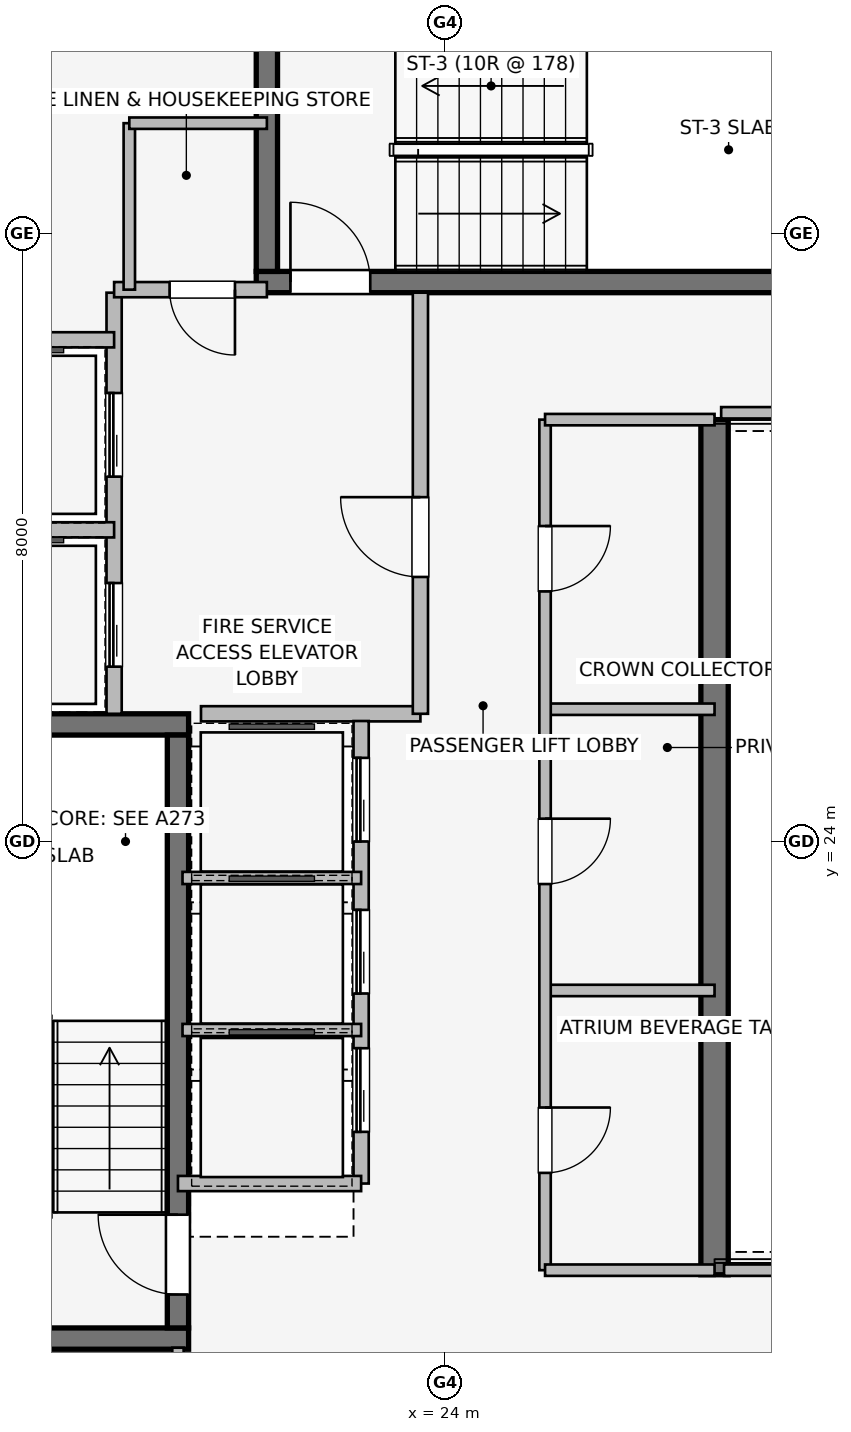
"""IFC4 building model, lengths in metres.
Left out: names, types, materials, properties, quantities, classifications, styles, units other than length and angle.
Written with IfcOpenShell. Run it as: python <this file> out.ifc"""

import sys

from ifc_helpers import new_model, si_unit, direction, frame, frame_2d, origin, place, context, subcontext, project, spatial, rectangle, extrude, element, fill, save


model = new_model("IFC4")
c1 = context("Model", 3, precision=1e-05, world=origin(), true_north=direction((0.0, 1.0)))
c2 = subcontext(c1, "Body", "Model", "MODEL_VIEW")
j1 = project(units=[si_unit("LENGTHUNIT", "METRE"), si_unit("PLANEANGLEUNIT", "RADIAN")], contexts=[c1])
p1 = place(None, origin())
s1 = spatial("IfcSite", under=j1, at=p1, CompositionType="ELEMENT")
p2 = place(p1, origin())
s2 = spatial("IfcBuilding", under=s1, at=p2, CompositionType="ELEMENT")
p3 = place(p2, frame((0.0, 0.0, 259.65)))
s3 = spatial("IfcBuildingStorey", under=s2, at=p3, CompositionType="ELEMENT", Elevation=259.65)
p4 = place(p3, frame((27.55, 29.55, 0.0), z_axis=(0.0, 0.0, 1.0), x_axis=(0.0, -1.0, 0.0)))
e1 = element("IfcWall", 1, at=p4, inside=s3, PredefinedType="SHEAR", context=c2, shape_type="SweptSolid", body=[
    extrude(rectangle(XDim=11.25, YDim=0.36, at=frame_2d((5.625, 0.0))), origin(), (0.0, 0.0, 1.0), 3.55),
])
for number, where, z_axis, x_axis in (
    (2, (16.87, 17.46, 0.0), (0.0, 0.0, 1.0), (1.0, 0.0, 0.0)),
    (3, (20.63, 25.54, 0.0), (0.0, 0.0, 1.0), (-1.0, 0.0, 0.0)),
):
    element("IfcWall", number, at=place(p3, frame(where, z_axis=z_axis, x_axis=x_axis)), inside=s3, PredefinedType="SHEAR", context=c2, shape_type="SweptSolid", body=[
        extrude(rectangle(XDim=3.76, YDim=0.28, at=frame_2d((1.88, 0.0))), origin(), (0.0, 0.0, 1.0), 3.55),
    ])
p5 = place(p3, frame((20.49, 17.6, 0.0), z_axis=(0.0, 0.0, 1.0), x_axis=(0.0, 1.0, 0.0)))
e4 = element("IfcWall", 4, at=p5, inside=s3, PredefinedType="SHEAR", context=c2, shape_type="SweptSolid", body=[
    extrude(rectangle(XDim=7.8, YDim=0.28, at=frame_2d((3.9, 0.0))), origin(), (0.0, 0.0, 1.0), 3.55),
])
p6 = place(p5, frame((0.44, 0.0, 0.0)))
e5 = element("IfcOpeningElement", 5, at=p6, cuts=e4, PredefinedType="OPENING", context=c2, shape_type="SweptSolid", body=[
    extrude(rectangle(XDim=1.05, YDim=2.0, at=frame_2d((0.525, 1.0))), frame((0.0, 0.15, 0.0), z_axis=(0.0, -1.0, 0.0), x_axis=(1.0, 0.0, 0.0)), (0.0, 0.0, 1.0), 0.3),
])
p7 = place(p3, frame((21.52, 31.36, 0.0), z_axis=(0.0, 0.0, 1.0), x_axis=(1.0, 0.0, 0.0)))
e6 = element("IfcWall", 6, at=p7, inside=s3, PredefinedType="SHEAR", context=c2, shape_type="SweptSolid", body=[
    extrude(rectangle(XDim=8.36, YDim=0.28, at=frame_2d((4.18, 0.0))), origin(), (0.0, 0.0, 1.0), 3.55),
])
p8 = place(p7, frame((0.45, 0.0, 0.0)))
e7 = element("IfcOpeningElement", 7, at=p8, cuts=e6, PredefinedType="OPENING", context=c2, shape_type="SweptSolid", body=[
    extrude(rectangle(XDim=1.05, YDim=2.0, at=frame_2d((0.525, 1.0))), frame((0.0, 0.15, 0.0), z_axis=(0.0, -1.0, 0.0), x_axis=(1.0, 0.0, 0.0)), (0.0, 0.0, 1.0), 0.3),
])
p9 = place(p3, frame((21.66, 34.7, 0.0), z_axis=(0.0, 0.0, 1.0), x_axis=(0.0, -1.0, 0.0)))
e8 = element("IfcWall", 8, at=p9, inside=s3, PredefinedType="SHEAR", context=c2, shape_type="SweptSolid", body=[
    extrude(rectangle(XDim=3.2, YDim=0.28, at=frame_2d((1.6, 0.0))), origin(), (0.0, 0.0, 1.0), 3.55),
])
p10 = place(p3, frame((17.566, 34.354, 0.0), z_axis=(0.0, 0.0, 1.0), x_axis=(0.888581481622, 0.458718814218, 0.0)))
e9 = element("IfcWall", 9, at=p10, inside=s3, PredefinedType="STANDARD", context=c2, shape_type="SweptSolid", body=[
    extrude(rectangle(XDim=15.077, YDim=0.31, at=frame_2d((7.539, 0.0))), origin(), (0.0, 0.0, 1.0), 3.29),
])
p11 = place(p10, frame((0.998, 0.0, 0.75)))
e10 = element("IfcOpeningElement", 10, at=p11, cuts=e9, PredefinedType="OPENING", context=c2, shape_type="SweptSolid", body=[
    extrude(rectangle(XDim=1.05, YDim=1.4, at=frame_2d((0.525, 0.7))), frame((0.0, 0.165, 0.0), z_axis=(0.0, -1.0, 0.0), x_axis=(1.0, 0.0, 0.0)), (0.0, 0.0, 1.0), 0.33),
])
p12 = place(p10, frame((4.403, 0.0, 0.75)))
e11 = element("IfcOpeningElement", 11, at=p12, cuts=e9, PredefinedType="OPENING", context=c2, shape_type="SweptSolid", body=[
    extrude(rectangle(XDim=1.05, YDim=1.4, at=frame_2d((0.525, 0.7))), frame((0.0, 0.165, 0.0), z_axis=(0.0, -1.0, 0.0), x_axis=(1.0, 0.0, 0.0)), (0.0, 0.0, 1.0), 0.33),
])
p13 = place(p10, frame((8.086, 0.0, 0.75)))
e12 = element("IfcOpeningElement", 12, at=p13, cuts=e9, PredefinedType="OPENING", context=c2, shape_type="SweptSolid", body=[
    extrude(rectangle(XDim=2.4, YDim=1.6, at=frame_2d((1.2, 0.8))), frame((0.0, 0.165, 0.0), z_axis=(0.0, -1.0, 0.0), x_axis=(1.0, 0.0, 0.0)), (0.0, 0.0, 1.0), 0.33),
])
p14 = place(p10, frame((13.029, 0.0, 0.75)))
e13 = element("IfcOpeningElement", 13, at=p14, cuts=e9, PredefinedType="OPENING", context=c2, shape_type="SweptSolid", body=[
    extrude(rectangle(XDim=1.05, YDim=1.4, at=frame_2d((0.525, 0.7))), frame((0.0, 0.165, 0.0), z_axis=(0.0, -1.0, 0.0), x_axis=(1.0, 0.0, 0.0)), (0.0, 0.0, 1.0), 0.33),
])
p15 = place(p3, frame((19.65, 25.68, 0.0), z_axis=(0.0, 0.0, 1.0), x_axis=(0.0, 1.0, 0.0)))
e14 = element("IfcWall", 14, at=p15, inside=s3, PredefinedType="PARTITIONING", context=c2, shape_type="SweptSolid", body=[
    extrude(rectangle(XDim=5.54, YDim=0.2, at=frame_2d((2.77, 0.0))), origin(), (0.0, 0.0, 1.0), 3.29),
])
p16 = place(p15, frame((0.62, 0.0, 0.0)))
e15 = element("IfcOpeningElement", 15, at=p16, cuts=e14, PredefinedType="OPENING", context=c2, shape_type="SweptSolid", body=[
    extrude(rectangle(XDim=1.1, YDim=2.2, at=frame_2d((0.55, 1.1))), frame((0.0, 0.11, 0.0), z_axis=(0.0, -1.0, 0.0), x_axis=(1.0, 0.0, 0.0)), (0.0, 0.0, 1.0), 0.22),
])
p17 = place(p15, frame((3.12, 0.0, 0.0)))
e16 = element("IfcOpeningElement", 16, at=p17, cuts=e14, PredefinedType="OPENING", context=c2, shape_type="SweptSolid", body=[
    extrude(rectangle(XDim=1.1, YDim=2.2, at=frame_2d((0.55, 1.1))), frame((0.0, 0.11, 0.0), z_axis=(0.0, -1.0, 0.0), x_axis=(1.0, 0.0, 0.0)), (0.0, 0.0, 1.0), 0.22),
])
p18 = place(p3, frame((20.793, 25.68, 0.0), z_axis=(0.0, 0.0, 1.0), x_axis=(1.0, 0.0, 0.0)))
e17 = element("IfcWall", 17, at=p18, inside=s3, PredefinedType="PARTITIONING", context=c2, shape_type="SweptSolid", body=[
    extrude(rectangle(XDim=2.887, YDim=0.2, at=frame_2d((1.443, 0.0))), origin(), (0.0, 0.0, 1.0), 3.29),
])
p19 = place(p3, frame((23.68, 25.68, 0.0), z_axis=(0.0, 0.0, 1.0), x_axis=(0.0, 1.0, 0.0)))
e18 = element("IfcWall", 18, at=p19, inside=s3, PredefinedType="PARTITIONING", context=c2, shape_type="SweptSolid", body=[
    extrude(rectangle(XDim=5.54, YDim=0.2, at=frame_2d((2.77, 0.0))), origin(), (0.0, 0.0, 1.0), 3.29),
])
p20 = place(p19, frame((1.8, 0.0, 0.0)))
e19 = element("IfcOpeningElement", 19, at=p20, cuts=e18, PredefinedType="OPENING", context=c2, shape_type="SweptSolid", body=[
    extrude(rectangle(XDim=1.05, YDim=2.0, at=frame_2d((0.525, 1.0))), frame((0.0, 0.11, 0.0), z_axis=(0.0, -1.0, 0.0), x_axis=(1.0, 0.0, 0.0)), (0.0, 0.0, 1.0), 0.22),
])
p21 = place(p3, frame((21.66, 31.26, 0.0), z_axis=(0.0, 0.0, 1.0), x_axis=(-1.0, 0.0, 0.0)))
e20 = element("IfcWall", 20, at=p21, inside=s3, PredefinedType="PARTITIONING", context=c2, shape_type="SweptSolid", body=[
    extrude(rectangle(XDim=2.01, YDim=0.2, at=frame_2d((1.005, 0.0))), origin(), (0.0, 0.0, 1.0), 3.29),
])
p22 = place(p21, frame((0.42, 0.0, 0.0)))
e21 = element("IfcOpeningElement", 21, at=p22, cuts=e20, PredefinedType="OPENING", context=c2, shape_type="SweptSolid", body=[
    extrude(rectangle(XDim=0.86, YDim=2.0, at=frame_2d((0.43, 1.0))), frame((0.0, 0.11, 0.0), z_axis=(0.0, -1.0, 0.0), x_axis=(1.0, 0.0, 0.0)), (0.0, 0.0, 1.0), 0.22),
])
p23 = place(p3, frame((17.15, 28.1, 0.0), z_axis=(0.0, 0.0, 1.0), x_axis=(1.0, 0.0, 0.0)))
e22 = element("IfcWall", 22, at=p23, inside=s3, PredefinedType="PARTITIONING", context=c2, shape_type="SweptSolid", body=[
    extrude(rectangle(XDim=2.5, YDim=0.2, at=frame_2d((1.25, 0.0))), origin(), (0.0, 0.0, 1.0), 3.29),
])
p24 = place(p3, frame((19.65, 30.6, 0.0), z_axis=(0.0, 0.0, 1.0), x_axis=(-1.0, 0.0, 0.0)))
e23 = element("IfcWall", 23, at=p24, inside=s3, PredefinedType="PARTITIONING", context=c2, shape_type="SweptSolid", body=[
    extrude(rectangle(XDim=2.5, YDim=0.2, at=frame_2d((1.25, 0.0))), origin(), (0.0, 0.0, 1.0), 2.19),
])
p25 = place(p3, frame((22.9, 19.5, 0.0), z_axis=(0.0, 0.0, 1.0), x_axis=(0.0, 1.0, 0.0)))
e24 = element("IfcWall", 24, at=p25, inside=s3, PredefinedType="PARTITIONING", context=c2, shape_type="SweptSolid", body=[
    extrude(rectangle(XDim=6.085, YDim=0.2, at=frame_2d((3.042, 0.0))), origin(), (0.0, 0.0, 1.0), 3.29),
])
p26 = place(p25, frame((0.68, 0.0, 0.0)))
e25 = element("IfcOpeningElement", 25, at=p26, cuts=e24, PredefinedType="OPENING", context=c2, shape_type="SweptSolid", body=[
    extrude(rectangle(XDim=1.1, YDim=2.2, at=frame_2d((0.55, 1.1))), frame((0.0, 0.11, 0.0), z_axis=(0.0, -1.0, 0.0), x_axis=(1.0, 0.0, 0.0)), (0.0, 0.0, 1.0), 0.22),
])
p27 = place(p25, frame((2.5, 0.0, 0.0)))
e26 = element("IfcOpeningElement", 26, at=p27, cuts=e24, PredefinedType="OPENING", context=c2, shape_type="SweptSolid", body=[
    extrude(rectangle(XDim=1.1, YDim=2.2, at=frame_2d((0.55, 1.1))), frame((0.0, 0.11, 0.0), z_axis=(0.0, -1.0, 0.0), x_axis=(1.0, 0.0, 0.0)), (0.0, 0.0, 1.0), 0.22),
])
p28 = place(p25, frame((4.5, 0.0, 0.0)))
e27 = element("IfcOpeningElement", 27, at=p28, cuts=e24, PredefinedType="OPENING", context=c2, shape_type="SweptSolid", body=[
    extrude(rectangle(XDim=1.1, YDim=2.2, at=frame_2d((0.55, 1.1))), frame((0.0, 0.11, 0.0), z_axis=(0.0, -1.0, 0.0), x_axis=(1.0, 0.0, 0.0)), (0.0, 0.0, 1.0), 0.22),
])
p29 = place(p3, frame((20.49, 19.5, 0.0), z_axis=(0.0, 0.0, 1.0), x_axis=(1.0, 0.0, 0.0)))
e28 = element("IfcWall", 28, at=p29, inside=s3, PredefinedType="PARTITIONING", context=c2, shape_type="SweptSolid", body=[
    extrude(rectangle(XDim=2.41, YDim=0.2, at=frame_2d((1.205, 0.0))), origin(), (0.0, 0.0, 1.0), 2.19),
])
for number, where, z_axis, x_axis in (
    (29, (20.55, 21.52, 0.0), (0.0, 0.0, 1.0), (1.0, 0.0, 0.0)),
    (30, (20.55, 23.52, 0.0), (0.0, 0.0, 1.0), (1.0, 0.0, 0.0)),
):
    element("IfcWall", number, at=place(p3, frame(where, z_axis=z_axis, x_axis=x_axis)), inside=s3, PredefinedType="PARTITIONING", context=c2, shape_type="SweptSolid", body=[
        extrude(rectangle(XDim=2.35, YDim=0.16, at=frame_2d((1.175, 0.0))), origin(), (0.0, 0.0, 1.0), 3.29),
    ])
for number, where, z_axis, x_axis in (
    (31, (25.32, 22.04, 0.0), (0.0, 0.0, 1.0), (1.0, 0.0, 0.0)),
    (32, (25.32, 25.74, 0.0), (0.0, 0.0, 1.0), (1.0, 0.0, 0.0)),
):
    element("IfcWall", number, at=place(p3, frame(where, z_axis=z_axis, x_axis=x_axis)), inside=s3, PredefinedType="PARTITIONING", context=c2, shape_type="SweptSolid", body=[
        extrude(rectangle(XDim=2.23, YDim=0.15, at=frame_2d((1.115, 0.0))), origin(), (0.0, 0.0, 1.0), 3.29),
    ])
p30 = place(p3, frame((25.32, 29.55, 0.0), z_axis=(0.0, 0.0, 1.0), x_axis=(0.0, -1.0, 0.0)))
e33 = element("IfcWall", 33, at=p30, inside=s3, PredefinedType="PARTITIONING", context=c2, shape_type="SweptSolid", body=[
    extrude(rectangle(XDim=11.19, YDim=0.15, at=frame_2d((5.595, 0.0))), origin(), (0.0, 0.0, 1.0), 3.29),
])
p31 = place(p30, frame((1.4, 0.0, 0.0)))
e34 = element("IfcOpeningElement", 34, at=p31, cuts=e33, PredefinedType="OPENING", context=c2, shape_type="SweptSolid", body=[
    extrude(rectangle(XDim=0.86, YDim=2.0, at=frame_2d((0.43, 1.0))), frame((0.0, 0.085, 0.0), z_axis=(0.0, -1.0, 0.0), x_axis=(1.0, 0.0, 0.0)), (0.0, 0.0, 1.0), 0.17),
])
p32 = place(p30, frame((5.25, 0.0, 0.0)))
e35 = element("IfcOpeningElement", 35, at=p32, cuts=e33, PredefinedType="OPENING", context=c2, shape_type="SweptSolid", body=[
    extrude(rectangle(XDim=0.86, YDim=2.0, at=frame_2d((0.43, 1.0))), frame((0.0, 0.085, 0.0), z_axis=(0.0, -1.0, 0.0), x_axis=(1.0, 0.0, 0.0)), (0.0, 0.0, 1.0), 0.17),
])
p33 = place(p30, frame((9.05, 0.0, 0.0)))
e36 = element("IfcOpeningElement", 36, at=p33, cuts=e33, PredefinedType="OPENING", context=c2, shape_type="SweptSolid", body=[
    extrude(rectangle(XDim=0.86, YDim=2.0, at=frame_2d((0.43, 1.0))), frame((0.0, 0.085, 0.0), z_axis=(0.0, -1.0, 0.0), x_axis=(1.0, 0.0, 0.0)), (0.0, 0.0, 1.0), 0.17),
])
p34 = place(p3, frame((25.32, 18.36, 0.0), z_axis=(0.0, 0.0, 1.0), x_axis=(1.0, 0.0, 0.0)))
e37 = element("IfcWall", 37, at=p34, inside=s3, PredefinedType="PARTITIONING", context=c2, shape_type="SweptSolid", body=[
    extrude(rectangle(XDim=2.23, YDim=0.15, at=frame_2d((1.115, 0.0))), origin(), (0.0, 0.0, 1.0), 3.29),
])
p35 = place(p3, frame((27.55, 29.55, 0.0), z_axis=(0.0, 0.0, 1.0), x_axis=(-1.0, 0.0, 0.0)))
e38 = element("IfcWall", 38, at=p35, inside=s3, PredefinedType="PARTITIONING", context=c2, shape_type="SweptSolid", body=[
    extrude(rectangle(XDim=2.23, YDim=0.15, at=frame_2d((1.115, 0.0))), origin(), (0.0, 0.0, 1.0), 2.19),
])
p36 = place(p3, frame((20.49, 14.82, 0.0), z_axis=(0.0, 0.0, 1.0), x_axis=(0.0, 1.0, 0.0)))
e39 = element("IfcWall", 39, at=p36, inside=s3, PredefinedType="PARTITIONING", context=c2, shape_type="SweptSolid", body=[
    extrude(rectangle(XDim=2.52, YDim=0.15, at=frame_2d((1.26, 0.0))), origin(), (0.0, 0.0, 1.0), 3.29),
])
p37 = place(p36, frame((0.72, 0.0, 0.0)))
e40 = element("IfcOpeningElement", 40, at=p37, cuts=e39, PredefinedType="OPENING", context=c2, shape_type="SweptSolid", body=[
    extrude(rectangle(XDim=0.86, YDim=2.0, at=frame_2d((0.43, 1.0))), frame((0.0, 0.085, 0.0), z_axis=(0.0, -1.0, 0.0), x_axis=(1.0, 0.0, 0.0)), (0.0, 0.0, 1.0), 0.17),
])
p38 = place(p3, frame((19.85, 33.45, 0.0), z_axis=(0.0, 0.0, 1.0), x_axis=(0.0, -1.0, 0.0)))
e41 = element("IfcWall", 41, at=p38, inside=s3, PredefinedType="PARTITIONING", context=c2, shape_type="SweptSolid", body=[
    extrude(rectangle(XDim=2.19, YDim=0.15, at=frame_2d((1.095, 0.0))), origin(), (0.0, 0.0, 1.0), 3.29),
])
p39 = place(p3, frame((21.66, 33.45, 0.0), z_axis=(0.0, 0.0, 1.0), x_axis=(-1.0, 0.0, 0.0)))
e42 = element("IfcWall", 42, at=p39, inside=s3, PredefinedType="PARTITIONING", context=c2, shape_type="SweptSolid", body=[
    extrude(rectangle(XDim=1.81, YDim=0.15, at=frame_2d((0.905, 0.0))), origin(), (0.0, 0.0, 1.0), 3.29),
])
p40 = place(p3, frame((27.675, 18.36, 0.0), z_axis=(0.0, 0.0, 1.0), x_axis=(1.0, 0.0, 0.0)))
e43 = element("IfcWall", 43, at=p40, inside=s3, PredefinedType="PARTITIONING", context=c2, shape_type="SweptSolid", body=[
    extrude(rectangle(XDim=12.165, YDim=0.15, at=frame_2d((6.083, 0.0))), origin(), (0.0, 0.0, 1.0), 2.431),
])
p41 = place(p3, frame((39.84, 29.64, 0.0), z_axis=(0.0, 0.0, 1.0), x_axis=(-1.0, 0.0, 0.0)))
e44 = element("IfcWall", 44, at=p41, inside=s3, PredefinedType="PARTITIONING", context=c2, shape_type="SweptSolid", body=[
    extrude(rectangle(XDim=12.203, YDim=0.15, at=frame_2d((6.102, 0.0))), origin(), (0.0, 0.0, 1.0), 2.431),
])
p42 = place(p6, origin())
e45 = element("IfcDoor", 45, at=p42, inside=s3, OperationType="SINGLE_SWING_RIGHT", PredefinedType="DOOR", context=c2, shape_type="SweptSolid", body=[
    extrude(rectangle(XDim=1.05, YDim=2.0, at=frame_2d((0.525, 1.0))), frame((0.0, 0.025, 0.0), z_axis=(0.0, -1.0, 0.0), x_axis=(1.0, 0.0, 0.0)), (0.0, 0.0, 1.0), 0.05),
])
fill(e5, e45)
p43 = place(p8, origin())
e46 = element("IfcDoor", 46, at=p43, inside=s3, OperationType="SINGLE_SWING_LEFT", PredefinedType="DOOR", context=c2, shape_type="SweptSolid", body=[
    extrude(rectangle(XDim=1.05, YDim=2.0, at=frame_2d((0.525, 1.0))), frame((0.0, 0.025, 0.0), z_axis=(0.0, -1.0, 0.0), x_axis=(1.0, 0.0, 0.0)), (0.0, 0.0, 1.0), 0.05),
])
fill(e7, e46)
p44 = place(p16, origin())
e47 = element("IfcDoor", 47, at=p44, inside=s3, OperationType="SLIDING_TO_LEFT", PredefinedType="DOOR", context=c2, shape_type="SweptSolid", body=[
    extrude(rectangle(XDim=1.1, YDim=2.2, at=frame_2d((0.55, 1.1))), frame((0.0, 0.025, 0.0), z_axis=(0.0, -1.0, 0.0), x_axis=(1.0, 0.0, 0.0)), (0.0, 0.0, 1.0), 0.05),
])
fill(e15, e47)
p45 = place(p17, origin())
e48 = element("IfcDoor", 48, at=p45, inside=s3, OperationType="SLIDING_TO_LEFT", PredefinedType="DOOR", context=c2, shape_type="SweptSolid", body=[
    extrude(rectangle(XDim=1.1, YDim=2.2, at=frame_2d((0.55, 1.1))), frame((0.0, 0.025, 0.0), z_axis=(0.0, -1.0, 0.0), x_axis=(1.0, 0.0, 0.0)), (0.0, 0.0, 1.0), 0.05),
])
fill(e16, e48)
p46 = place(p20, origin())
e49 = element("IfcDoor", 49, at=p46, inside=s3, OperationType="SINGLE_SWING_RIGHT", PredefinedType="DOOR", context=c2, shape_type="SweptSolid", body=[
    extrude(rectangle(XDim=1.05, YDim=2.0, at=frame_2d((0.525, 1.0))), frame((0.0, 0.025, 0.0), z_axis=(0.0, -1.0, 0.0), x_axis=(1.0, 0.0, 0.0)), (0.0, 0.0, 1.0), 0.05),
])
fill(e19, e49)
p47 = place(p22, origin())
e50 = element("IfcDoor", 50, at=p47, inside=s3, OperationType="SINGLE_SWING_LEFT", PredefinedType="DOOR", context=c2, shape_type="SweptSolid", body=[
    extrude(rectangle(XDim=0.86, YDim=2.0, at=frame_2d((0.43, 1.0))), frame((0.0, 0.025, 0.0), z_axis=(0.0, -1.0, 0.0), x_axis=(1.0, 0.0, 0.0)), (0.0, 0.0, 1.0), 0.05),
])
fill(e21, e50)
p48 = place(p26, origin())
e51 = element("IfcDoor", 51, at=p48, inside=s3, OperationType="SLIDING_TO_LEFT", PredefinedType="DOOR", context=c2, shape_type="SweptSolid", body=[
    extrude(rectangle(XDim=1.1, YDim=2.2, at=frame_2d((0.55, 1.1))), frame((0.0, 0.025, 0.0), z_axis=(0.0, -1.0, 0.0), x_axis=(1.0, 0.0, 0.0)), (0.0, 0.0, 1.0), 0.05),
])
fill(e25, e51)
p49 = place(p27, origin())
e52 = element("IfcDoor", 52, at=p49, inside=s3, OperationType="SLIDING_TO_LEFT", PredefinedType="DOOR", context=c2, shape_type="SweptSolid", body=[
    extrude(rectangle(XDim=1.1, YDim=2.2, at=frame_2d((0.55, 1.1))), frame((0.0, 0.025, 0.0), z_axis=(0.0, -1.0, 0.0), x_axis=(1.0, 0.0, 0.0)), (0.0, 0.0, 1.0), 0.05),
])
fill(e26, e52)
p50 = place(p28, origin())
e53 = element("IfcDoor", 53, at=p50, inside=s3, OperationType="SLIDING_TO_LEFT", PredefinedType="DOOR", context=c2, shape_type="SweptSolid", body=[
    extrude(rectangle(XDim=1.1, YDim=2.2, at=frame_2d((0.55, 1.1))), frame((0.0, 0.025, 0.0), z_axis=(0.0, -1.0, 0.0), x_axis=(1.0, 0.0, 0.0)), (0.0, 0.0, 1.0), 0.05),
])
fill(e27, e53)
p51 = place(p31, origin())
e54 = element("IfcDoor", 54, at=p51, inside=s3, OperationType="SINGLE_SWING_LEFT", PredefinedType="DOOR", context=c2, shape_type="SweptSolid", body=[
    extrude(rectangle(XDim=0.86, YDim=2.0, at=frame_2d((0.43, 1.0))), frame((0.0, 0.025, 0.0), z_axis=(0.0, -1.0, 0.0), x_axis=(1.0, 0.0, 0.0)), (0.0, 0.0, 1.0), 0.05),
])
fill(e34, e54)
p52 = place(p32, origin())
e55 = element("IfcDoor", 55, at=p52, inside=s3, OperationType="SINGLE_SWING_LEFT", PredefinedType="DOOR", context=c2, shape_type="SweptSolid", body=[
    extrude(rectangle(XDim=0.86, YDim=2.0, at=frame_2d((0.43, 1.0))), frame((0.0, 0.025, 0.0), z_axis=(0.0, -1.0, 0.0), x_axis=(1.0, 0.0, 0.0)), (0.0, 0.0, 1.0), 0.05),
])
fill(e35, e55)
p53 = place(p33, origin())
e56 = element("IfcDoor", 56, at=p53, inside=s3, OperationType="SINGLE_SWING_LEFT", PredefinedType="DOOR", context=c2, shape_type="SweptSolid", body=[
    extrude(rectangle(XDim=0.86, YDim=2.0, at=frame_2d((0.43, 1.0))), frame((0.0, 0.025, 0.0), z_axis=(0.0, -1.0, 0.0), x_axis=(1.0, 0.0, 0.0)), (0.0, 0.0, 1.0), 0.05),
])
fill(e36, e56)
save(model, sys.argv[1])
